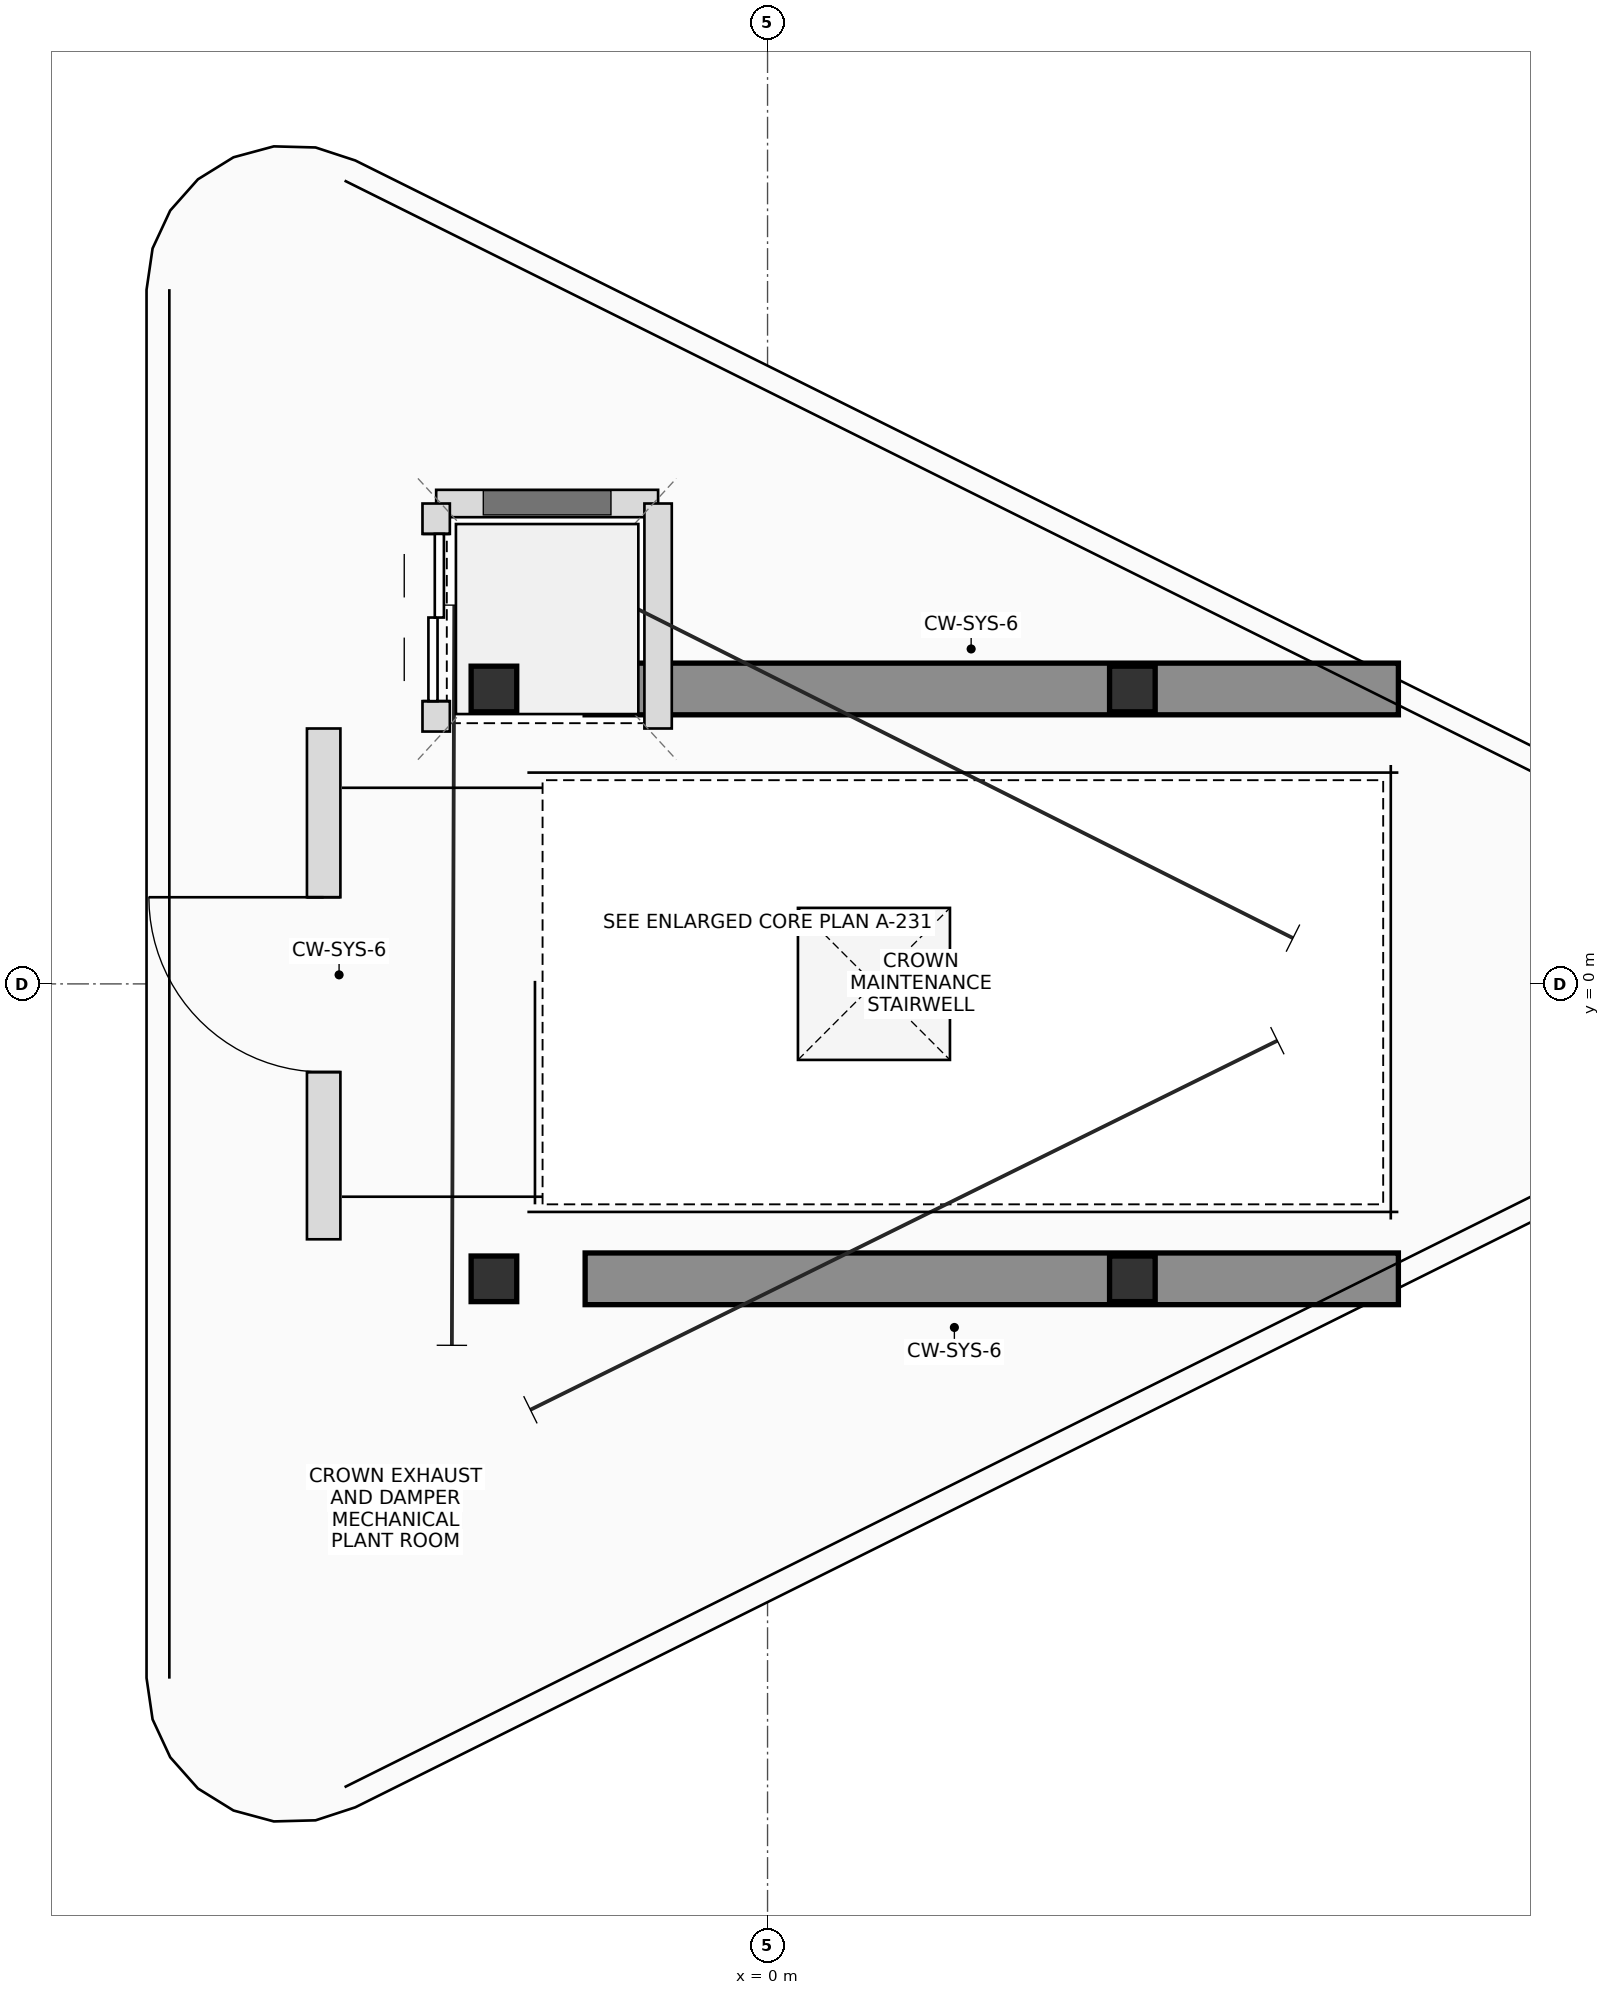
"""IFC4 building model, lengths in metres.
Left out: names, types, materials, properties, quantities, classifications, styles, units other than length and angle.
Written with IfcOpenShell. Run it as: python <this file> out.ifc"""

import sys

from ifc_helpers import new_model, si_unit, direction, frame, frame_2d, origin, origin_2d, place, context, subcontext, project, spatial, rectangle, i_section, extrude, source, transform, mapped, element, fill, save


model = new_model("IFC4")
c1 = context("Model", 3, precision=1e-05, world=origin(), true_north=direction((0.0, 1.0)))
c2 = subcontext(c1, "Body", "Model", "MODEL_VIEW")
j1 = project(units=[si_unit("LENGTHUNIT", "METRE"), si_unit("PLANEANGLEUNIT", "RADIAN")], contexts=[c1])
p1 = place(None, origin())
s1 = spatial("IfcSite", under=j1, at=p1, CompositionType="ELEMENT")
p2 = place(p1, origin())
s2 = spatial("IfcBuilding", under=s1, at=p2, CompositionType="ELEMENT")
p3 = place(p2, frame((0.0, 0.0, 343.85)))
s3 = spatial("IfcBuildingStorey", under=s2, at=p3, CompositionType="ELEMENT", Elevation=343.85)
m1 = source(origin(), c2, "Body", "SweptSolid", [
    extrude(i_section(OverallWidth=0.3, OverallDepth=0.3, WebThickness=0.01, FlangeThickness=0.015, FilletRadius=0.018, at=origin_2d()), origin(), (0.0, 0.0, 1.0), 5.2),
])
for number, where, z_axis, x_axis in (
    (1, (-1.8, -1.94, 0.0), (0.0, 0.0, 1.0), (1.0, 0.0, 0.0)),
    (2, (2.4, 1.94, 0.0), (0.0, 0.0, 1.0), (1.0, 0.0, 0.0)),
    (3, (2.4, -1.94, 0.0), (0.0, 0.0, 1.0), (1.0, 0.0, 0.0)),
    (4, (-1.8, 1.94, 0.0), (0.0, 0.0, 1.0), (1.0, 0.0, 0.0)),
):
    element("IfcColumn", number, at=place(p3, frame(where, z_axis=z_axis, x_axis=x_axis)), inside=s3, PredefinedType="COLUMN", context=c2, shape_type="MappedRepresentation", body=[
        mapped(m1, transform((0.0, 0.0, 0.0), scale=1.0)),
    ])
for number, where, z_axis, x_axis in (
    (5, (-1.2, 1.94, 0.0), (0.0, 0.0, 1.0), (1.0, 0.0, 0.0)),
    (6, (-1.2, -1.94, 0.0), (0.0, 0.0, 1.0), (1.0, 0.0, 0.0)),
):
    element("IfcWall", number, at=place(p3, frame(where, z_axis=z_axis, x_axis=x_axis)), inside=s3, PredefinedType="SHEAR", context=c2, shape_type="SweptSolid", body=[
        extrude(rectangle(XDim=5.35, YDim=0.34, at=frame_2d((2.675, 0.0))), origin(), (0.0, 0.0, 1.0), 5.2),
    ])
p4 = place(p3, frame((-2.18, 3.16, 0.0), z_axis=(0.0, 0.0, 1.0), x_axis=(1.0, 0.0, 0.0)))
e7 = element("IfcWall", 7, at=p4, inside=s3, PredefinedType="PLUMBINGWALL", context=c2, shape_type="SweptSolid", body=[
    extrude(rectangle(XDim=1.46, YDim=0.18, at=frame_2d((0.73, 0.0))), origin(), (0.0, 0.0, 1.0), 5.18),
])
p5 = place(p3, frame((-2.18, 1.66, 0.0), z_axis=(0.0, 0.0, 1.0), x_axis=(0.0, 1.0, 0.0)))
e8 = element("IfcWall", 8, at=p5, inside=s3, PredefinedType="PLUMBINGWALL", context=c2, shape_type="SweptSolid", body=[
    extrude(rectangle(XDim=1.5, YDim=0.18, at=frame_2d((0.75, 0.0))), origin(), (0.0, 0.0, 1.0), 5.18),
])
p6 = place(p5, frame((0.2, 0.0, 0.0)))
e9 = element("IfcOpeningElement", 9, at=p6, cuts=e8, PredefinedType="OPENING", context=c2, shape_type="SweptSolid", body=[
    extrude(rectangle(XDim=1.1, YDim=2.2, at=frame_2d((0.55, 1.1))), frame((0.0, 0.1, 0.0), z_axis=(0.0, -1.0, 0.0), x_axis=(1.0, 0.0, 0.0)), (0.0, 0.0, 1.0), 0.2),
])
p7 = place(p3, frame((-0.72, 1.68, 0.0), z_axis=(0.0, 0.0, 1.0), x_axis=(0.0, 1.0, 0.0)))
e10 = element("IfcWall", 10, at=p7, inside=s3, PredefinedType="PLUMBINGWALL", context=c2, shape_type="SweptSolid", body=[
    extrude(rectangle(XDim=1.48, YDim=0.18, at=frame_2d((0.74, 0.0))), origin(), (0.0, 0.0, 1.0), 4.585),
])
p8 = place(p3, frame((-2.92, -1.68, 0.0), z_axis=(0.0, 0.0, 1.0), x_axis=(0.0, 1.0, 0.0)))
e11 = element("IfcWall", 11, at=p8, inside=s3, PredefinedType="PLUMBINGWALL", context=c2, shape_type="SweptSolid", body=[
    extrude(rectangle(XDim=3.36, YDim=0.22, at=frame_2d((1.68, 0.0))), origin(), (0.0, 0.0, 1.0), 5.18),
])
p9 = place(p8, frame((1.1, 0.0, 0.0)))
e12 = element("IfcOpeningElement", 12, at=p9, cuts=e11, PredefinedType="OPENING", context=c2, shape_type="SweptSolid", body=[
    extrude(rectangle(XDim=1.15, YDim=2.15, at=frame_2d((0.575, 1.075))), frame((0.0, 0.12, 0.0), z_axis=(0.0, -1.0, 0.0), x_axis=(1.0, 0.0, 0.0)), (0.0, 0.0, 1.0), 0.24),
])
p10 = place(p2, frame((0.0, 0.0, 349.05)))
p11 = place(p10, origin())
p12 = place(p11, frame((0.7, 0.0, 0.0)))
p13 = place(p12, frame((0.0, 0.0, 0.2)))
e13 = element("IfcDoor", 13, at=p13, inside=s3, OperationType="SINGLE_SWING_LEFT", PredefinedType="TRAPDOOR", context=c2, shape_type="SweptSolid", body=[
    extrude(rectangle(XDim=1.0, YDim=1.0, at=origin_2d()), origin(), (0.0, 0.0, 1.0), 0.05),
])
p14 = place(p6, origin())
e14 = element("IfcDoor", 14, at=p14, inside=s3, OperationType="DOUBLE_DOOR_SLIDING", PredefinedType="DOOR", context=c2, shape_type="SweptSolid", body=[
    extrude(rectangle(XDim=1.1, YDim=2.2, at=frame_2d((0.55, 1.1))), frame((0.0, 0.025, 0.0), z_axis=(0.0, -1.0, 0.0), x_axis=(1.0, 0.0, 0.0)), (0.0, 0.0, 1.0), 0.05),
])
fill(e9, e14)
p15 = place(p9, origin())
e15 = element("IfcDoor", 15, at=p15, inside=s3, OperationType="SINGLE_SWING_RIGHT", PredefinedType="DOOR", context=c2, shape_type="SweptSolid", body=[
    extrude(rectangle(XDim=1.15, YDim=2.15, at=frame_2d((0.575, 1.075))), frame((0.0, 0.025, 0.0), z_axis=(0.0, -1.0, 0.0), x_axis=(1.0, 0.0, 0.0)), (0.0, 0.0, 1.0), 0.05),
])
fill(e12, e15)
save(model, sys.argv[1])
